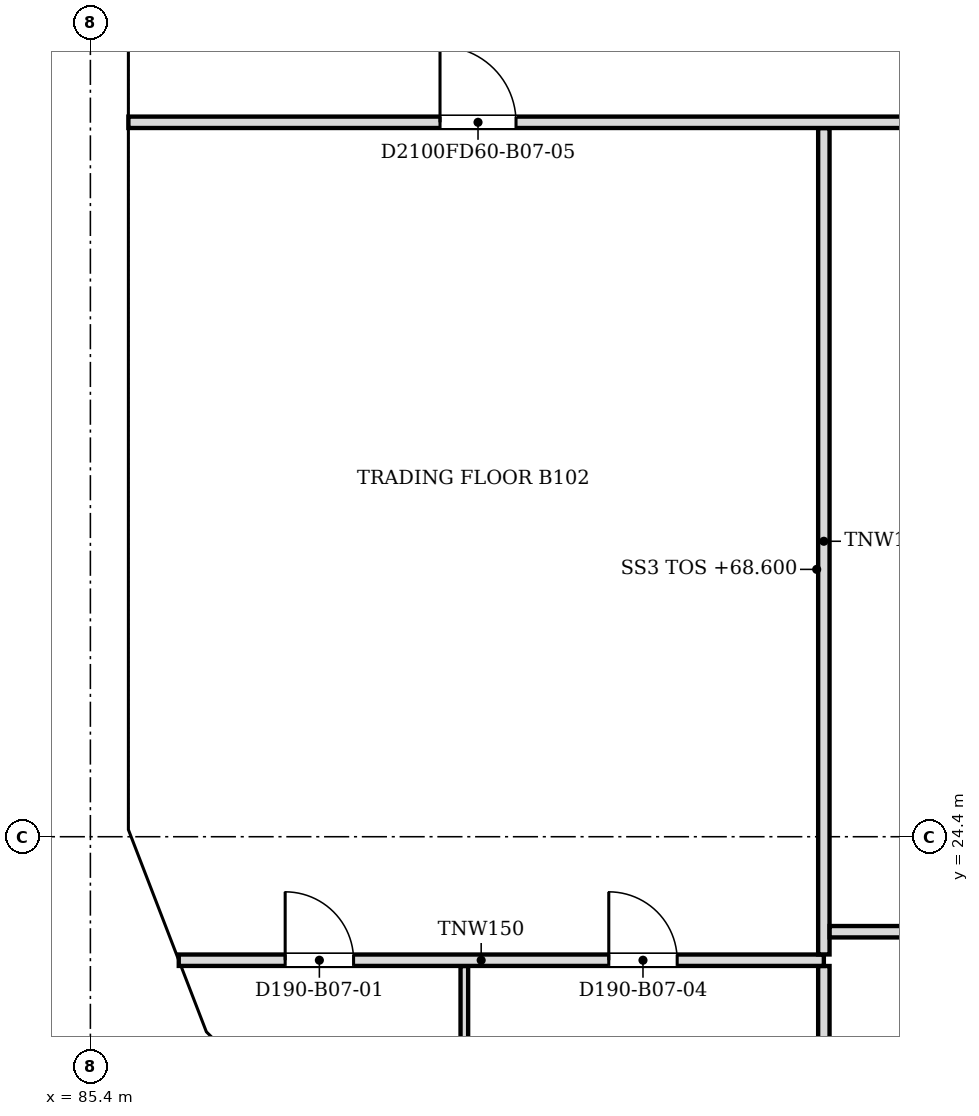
"""IFC4 building model, lengths in metres.
Left out: names, types, materials, properties, quantities, classifications, styles, units other than length and angle.
Written with IfcOpenShell. Run it as: python <this file> out.ifc"""

import sys

from ifc_helpers import new_model, si_unit, direction, frame, frame_2d, origin, place, context, subcontext, project, spatial, polyline, rectangle, outline, extrude, faceted_brep, source, transform, mapped, element, fill, save


model = new_model("IFC4")
c1 = context("Model", 3, precision=1e-05, world=origin(), true_north=direction((0.0, 1.0)))
c2 = subcontext(c1, "Body", "Model", "MODEL_VIEW")
j1 = project(units=[si_unit("LENGTHUNIT", "METRE"), si_unit("PLANEANGLEUNIT", "RADIAN")], contexts=[c1])
p1 = place(None, origin())
s1 = spatial("IfcSite", under=j1, at=p1, CompositionType="ELEMENT")
p2 = place(p1, origin())
s2 = spatial("IfcBuilding", under=s1, at=p2, CompositionType="ELEMENT")
p3 = place(p2, frame((0.0, 0.0, 68.6)))
s3 = spatial("IfcBuildingStorey", under=s2, at=p3, CompositionType="ELEMENT", Elevation=68.6)
m1 = source(origin(), c2, "Body", "SweptSolid", [
    extrude(outline(polyline([(6.1, 0.0), (3.05, 3.8), (0.0, 0.0), (6.1, 0.0)])), frame((0.0, 0.25, 0.0), z_axis=(0.0, -1.0, 0.0), x_axis=(1.0, 0.0, 0.0)), (0.0, 0.0, 1.0), 0.5),
])
p4 = place(p3, frame((85.65, 36.6, 0.0), z_axis=(0.0, 0.0, 1.0), x_axis=(0.0, -1.0, 0.0)))
e1 = element("IfcWall", 1, at=p4, inside=s3, PredefinedType="SOLIDWALL", context=c2, shape_type="MappedRepresentation", body=[
    mapped(m1, transform((0.0, 0.0, 0.0), scale=1.0)),
])
m2 = source(origin(), c2, "Body", "SweptSolid", [
    extrude(outline(polyline([(5.579, 0.25), (3.05, 3.4), (0.521, 0.25), (5.579, 0.25)])), frame((0.0, 0.26, 0.0), z_axis=(0.0, -1.0, 0.0), x_axis=(1.0, 0.0, 0.0)), (0.0, 0.0, 1.0), 0.52),
])
p5 = place(p4, origin())
e2 = element("IfcOpeningElement", 2, at=p5, cuts=e1, PredefinedType="OPENING", context=c2, shape_type="MappedRepresentation", body=[
    mapped(m2, transform((0.0, 0.0, 0.0), scale=1.0)),
])
m3 = source(origin(), c2, "Body", "Brep", [
    faceted_brep([(6.053, -0.25, 0.0), (3.05, -0.25, 3.8), (0.0, -0.25, 0.0), (0.0, 0.25, 0.0), (3.05, 0.25, 3.8), (6.007, 0.25, 0.059), (6.007, 0.25, 0.0), (6.053, 0.0, 0.0)], [[[0, 1, 2]], [[3, 4, 5, 6]], [[5, 4, 1, 0, 7]], [[4, 3, 2, 1]], [[3, 6, 7, 0, 2]], [[7, 6, 5]]]),
])
p6 = place(p3, frame((85.65, 30.5, 0.0), z_axis=(0.0, 0.0, 1.0), x_axis=(0.0, -1.0, 0.0)))
e3 = element("IfcWall", 3, at=p6, inside=s3, PredefinedType="SOLIDWALL", context=c2, shape_type="MappedRepresentation", body=[
    mapped(m3, transform((0.0, 0.0, 0.0), scale=1.0)),
])
m4 = source(origin(), c2, "Body", "SweptSolid", [
    extrude(outline(polyline([(5.537, 0.25), (3.049, 3.399), (0.521, 0.25), (5.537, 0.25)])), frame((0.0, 0.26, 0.0), z_axis=(0.0, -1.0, 0.0), x_axis=(1.0, 0.0, 0.0)), (0.0, 0.0, 1.0), 0.52),
])
p7 = place(p6, origin())
e4 = element("IfcOpeningElement", 4, at=p7, cuts=e3, PredefinedType="OPENING", context=c2, shape_type="MappedRepresentation", body=[
    mapped(m4, transform((0.0, 0.0, 0.0), scale=1.0)),
])
m5 = source(origin(), c2, "Body", "Brep", [
    faceted_brep([(3.003, -0.25, 3.731), (2.95, -0.25, 3.8), (0.0, -0.25, 0.0), (3.003, -0.25, 0.0), (0.047, 0.25, 0.06), (2.898, 0.25, 3.732), (2.898, 0.25, 0.0), (0.047, 0.25, 0.0), (2.95, 0.0, 3.8), (0.0, 0.0, 0.0)], [[[0, 1, 2, 3]], [[4, 5, 6, 7]], [[8, 1, 0]], [[5, 4, 9, 2, 1, 8]], [[7, 6, 3, 2, 9]], [[7, 9, 4]], [[3, 6, 5, 8, 0]]]),
])
p8 = place(p3, frame((85.65, 24.447, 0.0), z_axis=(0.0, 0.0, 1.0), x_axis=(0.35992665181, -0.932980602862, 0.0)))
e5 = element("IfcWall", 5, at=p8, inside=s3, PredefinedType="SOLIDWALL", context=c2, shape_type="MappedRepresentation", body=[
    mapped(m5, transform((0.0, 0.0, 0.0), scale=1.0)),
])
m6 = source(origin(), c2, "Body", "SweptSolid", [
    extrude(outline(polyline([(2.75, 3.135), (0.511, 0.25), (2.75, 0.25), (2.75, 3.135)])), frame((0.0, 0.26, 0.0), z_axis=(0.0, -1.0, 0.0), x_axis=(1.0, 0.0, 0.0)), (0.0, 0.0, 1.0), 0.52),
])
p9 = place(p8, origin())
e6 = element("IfcOpeningElement", 6, at=p9, cuts=e5, PredefinedType="OPENING", context=c2, shape_type="MappedRepresentation", body=[
    mapped(m6, transform((0.0, 0.0, 0.0), scale=1.0)),
])
m7 = source(origin(), c2, "Body", "Brep", [
    faceted_brep([(2.997, -0.25, 0.0), (0.053, -0.25, 3.8), (0.0, -0.25, 3.732), (0.0, -0.25, 0.0), (0.106, 0.25, 3.731), (2.944, 0.25, 0.068), (2.944, 0.25, 0.0), (0.106, 0.25, 0.0), (0.053, 0.0, 3.8), (2.997, 0.0, 0.0)], [[[0, 1, 2, 3]], [[4, 5, 6, 7]], [[5, 4, 8, 1, 0, 9]], [[2, 1, 8]], [[7, 6, 9, 0, 3]], [[7, 3, 2, 8, 4]], [[9, 6, 5]]]),
])
p10 = place(p3, frame((86.675, 21.731, 0.0), z_axis=(0.0, 0.0, 1.0), x_axis=(0.707106781187, -0.707106781187, 0.0)))
e7 = element("IfcWall", 7, at=p10, inside=s3, PredefinedType="SOLIDWALL", context=c2, shape_type="MappedRepresentation", body=[
    mapped(m7, transform((0.0, 0.0, 0.0), scale=1.0)),
])
m8 = source(origin(), c2, "Body", "SweptSolid", [
    extrude(outline(polyline([(2.487, 0.25), (0.253, 3.134), (0.253, 0.25), (2.487, 0.25)])), frame((0.0, 0.26, 0.0), z_axis=(0.0, -1.0, 0.0), x_axis=(1.0, 0.0, 0.0)), (0.0, 0.0, 1.0), 0.52),
])
p11 = place(p10, origin())
e8 = element("IfcOpeningElement", 8, at=p11, cuts=e7, PredefinedType="OPENING", context=c2, shape_type="MappedRepresentation", body=[
    mapped(m8, transform((0.0, 0.0, 0.0), scale=1.0)),
])
p12 = place(p2, frame((0.0, 0.0, 72.4)))
s4 = spatial("IfcBuildingStorey", under=s2, at=p12, CompositionType="ELEMENT", Elevation=72.4)
m9 = source(origin(), c2, "Body", "Brep", [
    faceted_brep([(3.05, -0.25, 0.0), (6.1, -0.25, 3.8), (6.1, -0.25, 3.8), (3.05, -0.25, 7.6), (0.0, -0.25, 3.8), (0.0, 0.25, 3.8), (3.05, 0.25, 7.6), (6.1, 0.25, 3.8), (6.1, 0.25, 3.8), (3.05, 0.25, 0.0)], [[[0, 1, 2, 3, 4]], [[5, 6, 7, 8, 9]], [[9, 8, 1, 0]], [[7, 6, 3, 2]], [[6, 5, 4, 3]], [[5, 9, 0, 4]], [[1, 8, 7, 2]]]),
])
p13 = place(p12, frame((85.65, 39.65, -3.8), z_axis=(0.0, 0.0, 1.0), x_axis=(0.0, -1.0, 0.0)))
e9 = element("IfcWall", 9, at=p13, inside=s4, PredefinedType="SOLIDWALL", context=c2, shape_type="MappedRepresentation", body=[
    mapped(m9, transform((0.0, 0.0, 0.0), scale=1.0)),
])
m10 = source(origin(), c2, "Body", "SweptSolid", [
    extrude(outline(polyline([(3.05, 0.399), (5.78, 3.8), (3.05, 7.2), (0.321, 3.8), (3.05, 0.399)])), frame((0.0, 0.26, 0.0), z_axis=(0.0, -1.0, 0.0), x_axis=(1.0, 0.0, 0.0)), (0.0, 0.0, 1.0), 0.52),
])
p14 = place(p13, origin())
e10 = element("IfcOpeningElement", 10, at=p14, cuts=e9, PredefinedType="OPENING", context=c2, shape_type="MappedRepresentation", body=[
    mapped(m10, transform((0.0, 0.0, 0.0), scale=1.0)),
])
m11 = source(origin(), c2, "Body", "SweptSolid", [
    extrude(outline(polyline([(3.05, 0.0), (6.1, 3.8), (3.05, 7.6), (0.0, 3.8), (3.05, 0.0)])), frame((0.0, 0.25, 0.0), z_axis=(0.0, -1.0, 0.0), x_axis=(1.0, 0.0, 0.0)), (0.0, 0.0, 1.0), 0.5),
])
p15 = place(p12, frame((85.65, 33.55, -3.8), z_axis=(0.0, 0.0, 1.0), x_axis=(0.0, -1.0, 0.0)))
e11 = element("IfcWall", 11, at=p15, inside=s4, PredefinedType="SOLIDWALL", context=c2, shape_type="MappedRepresentation", body=[
    mapped(m11, transform((0.0, 0.0, 0.0), scale=1.0)),
])
p16 = place(p15, origin())
e12 = element("IfcOpeningElement", 12, at=p16, cuts=e11, PredefinedType="OPENING", context=c2, shape_type="MappedRepresentation", body=[
    mapped(m10, transform((0.0, 0.0, 0.0), scale=1.0)),
])
m12 = source(origin(), c2, "Body", "Brep", [
    faceted_brep([(3.003, -0.25, 0.0), (3.05, -0.25, 0.06), (3.05, -0.25, 7.54), (3.003, -0.25, 7.6), (0.0, -0.25, 3.8), (0.0, 0.25, 3.8), (2.957, 0.25, 7.541), (2.957, 0.25, 0.059), (3.003, 0.0, 0.0), (3.003, 0.0, 7.6)], [[[0, 1, 2, 3, 4]], [[5, 6, 7]], [[1, 0, 8]], [[9, 3, 2]], [[6, 5, 4, 3, 9]], [[5, 7, 8, 0, 4]], [[1, 8, 7, 6, 9, 2]]]),
])
p17 = place(p12, frame((85.65, 27.45, -3.8), z_axis=(0.0, 0.0, 1.0), x_axis=(0.0, -1.0, 0.0)))
e13 = element("IfcWall", 13, at=p17, inside=s4, PredefinedType="SOLIDWALL", context=c2, shape_type="MappedRepresentation", body=[
    mapped(m12, transform((0.0, 0.0, 0.0), scale=1.0)),
])
m13 = source(origin(), c2, "Body", "SweptSolid", [
    extrude(outline(polyline([(2.803, 6.944), (0.319, 3.8), (2.803, 0.656), (2.803, 6.944)])), frame((0.0, 0.26, 0.0), z_axis=(0.0, -1.0, 0.0), x_axis=(1.0, 0.0, 0.0)), (0.0, 0.0, 1.0), 0.52),
])
p18 = place(p17, origin())
e14 = element("IfcOpeningElement", 14, at=p18, cuts=e13, PredefinedType="OPENING", context=c2, shape_type="MappedRepresentation", body=[
    mapped(m13, transform((0.0, 0.0, 0.0), scale=1.0)),
])
m14 = source(origin(), c2, "Body", "Brep", [
    faceted_brep([(0.047, -0.25, 0.0), (2.997, -0.25, 3.8), (0.047, -0.25, 7.6), (0.0, -0.25, 7.541), (0.0, -0.25, 0.059), (0.093, 0.25, 7.54), (2.944, 0.25, 3.868), (2.944, 0.25, 3.732), (0.093, 0.25, 0.06), (2.997, 0.0, 3.8), (0.047, 0.0, 0.0), (0.047, 0.0, 7.6)], [[[0, 1, 2, 3, 4]], [[5, 6, 7, 8]], [[8, 7, 9, 1, 0, 10]], [[6, 5, 11, 2, 1, 9]], [[3, 2, 11]], [[10, 0, 4]], [[8, 10, 4, 3, 11, 5]], [[9, 7, 6]]]),
])
p19 = place(p12, frame((85.633, 24.49, -3.8), z_axis=(0.0, 0.0, 1.0), x_axis=(0.359901446078, -0.932990326376, 0.0)))
e15 = element("IfcWall", 15, at=p19, inside=s4, PredefinedType="SOLIDWALL", context=c2, shape_type="MappedRepresentation", body=[
    mapped(m14, transform((0.0, 0.0, 0.0), scale=1.0)),
])
m15 = source(origin(), c2, "Body", "SweptSolid", [
    extrude(outline(polyline([(0.247, 0.665), (2.681, 3.8), (0.247, 6.935), (0.247, 0.665)])), frame((0.0, 0.26, 0.0), z_axis=(0.0, -1.0, 0.0), x_axis=(1.0, 0.0, 0.0)), (0.0, 0.0, 1.0), 0.52),
])
p20 = place(p19, origin())
e16 = element("IfcOpeningElement", 16, at=p20, cuts=e15, PredefinedType="OPENING", context=c2, shape_type="MappedRepresentation", body=[
    mapped(m15, transform((0.0, 0.0, 0.0), scale=1.0)),
])
m16 = source(origin(), c2, "Body", "Brep", [
    faceted_brep([(2.944, -0.25, 0.0), (2.997, -0.25, 0.068), (2.997, -0.25, 7.532), (2.944, -0.25, 7.6), (0.0, -0.25, 3.8), (0.053, 0.25, 3.868), (2.891, 0.25, 7.532), (2.891, 0.25, 0.068), (0.053, 0.25, 3.731), (2.944, 0.0, 0.0), (2.944, 0.0, 7.6), (0.0, 0.0, 3.8)], [[[0, 1, 2, 3, 4]], [[5, 6, 7, 8]], [[1, 0, 9]], [[10, 3, 2]], [[6, 5, 11, 4, 3, 10]], [[8, 7, 9, 0, 4, 11]], [[8, 11, 5]], [[1, 9, 7, 6, 10, 2]]]),
])
p21 = place(p12, frame((86.712, 21.694, -3.8), z_axis=(0.0, 0.0, 1.0), x_axis=(0.707066050402, -0.707147509625, 0.0)))
e17 = element("IfcWall", 17, at=p21, inside=s4, PredefinedType="SOLIDWALL", context=c2, shape_type="MappedRepresentation", body=[
    mapped(m16, transform((0.0, 0.0, 0.0), scale=1.0)),
])
m17 = source(origin(), c2, "Body", "SweptSolid", [
    extrude(outline(polyline([(2.744, 6.934), (0.316, 3.8), (2.744, 0.666), (2.744, 6.934)])), frame((0.0, 0.26, 0.0), z_axis=(0.0, -1.0, 0.0), x_axis=(1.0, 0.0, 0.0)), (0.0, 0.0, 1.0), 0.52),
])
p22 = place(p21, origin())
e18 = element("IfcOpeningElement", 18, at=p22, cuts=e17, PredefinedType="OPENING", context=c2, shape_type="MappedRepresentation", body=[
    mapped(m17, transform((0.0, 0.0, 0.0), scale=1.0)),
])
p23 = place(p3, frame((95.05, 18.8, 0.0), z_axis=(0.0, 0.0, 1.0), x_axis=(0.0, 1.0, 0.0)))
e19 = element("IfcWall", 19, at=p23, inside=s3, PredefinedType="PARTITIONING", context=c2, shape_type="SweptSolid", body=[
    extrude(rectangle(XDim=3.899, YDim=0.15, at=frame_2d((1.949, 0.0))), origin(), (0.0, 0.0, 1.0), 3.067),
])
p24 = place(p3, frame((90.32, 19.291, 0.0), z_axis=(0.0, 0.0, 1.0), x_axis=(0.0, 1.0, 0.0)))
e20 = element("IfcWall", 20, at=p24, inside=s3, PredefinedType="PARTITIONING", context=c2, shape_type="SweptSolid", body=[
    extrude(rectangle(XDim=3.408, YDim=0.1, at=frame_2d((1.704, 0.0))), origin(), (0.0, 0.0, 1.0), 3.067),
])
p25 = place(p3, frame((95.05, 22.775, 0.0), z_axis=(0.0, 0.0, 1.0), x_axis=(-1.0, 0.0, 0.0)))
e21 = element("IfcWall", 21, at=p25, inside=s3, PredefinedType="PARTITIONING", context=c2, shape_type="SweptSolid", body=[
    extrude(rectangle(XDim=8.487, YDim=0.15, at=frame_2d((4.244, 0.0))), origin(), (0.0, 0.0, 1.0), 3.067),
])
m18 = source(origin(), c2, "Body", "SweptSolid", [
    extrude(rectangle(XDim=0.9, YDim=2.1, at=frame_2d((0.45, 1.05))), frame((0.0, 0.085, 0.0), z_axis=(0.0, -1.0, 0.0), x_axis=(1.0, 0.0, 0.0)), (0.0, 0.0, 1.0), 0.17),
])
p26 = place(p25, frame((6.187, 0.0, 0.0)))
e22 = element("IfcOpeningElement", 22, at=p26, cuts=e21, PredefinedType="OPENING", context=c2, shape_type="MappedRepresentation", body=[
    mapped(m18, transform((0.0, 0.0, 0.0), scale=1.0)),
])
p27 = place(p25, frame((1.93, 0.0, 0.0)))
e23 = element("IfcOpeningElement", 23, at=p27, cuts=e21, PredefinedType="OPENING", context=c2, shape_type="MappedRepresentation", body=[
    mapped(m18, transform((0.0, 0.0, 0.0), scale=1.0)),
])
p28 = place(p3, frame((95.05, 22.851, 0.0), z_axis=(0.0, 0.0, 1.0), x_axis=(0.0, 1.0, 0.0)))
e24 = element("IfcWall", 24, at=p28, inside=s3, PredefinedType="PARTITIONING", context=c2, shape_type="SweptSolid", body=[
    extrude(rectangle(XDim=10.873, YDim=0.15, at=frame_2d((5.437, 0.0))), origin(), (0.0, 0.0, 1.0), 3.067),
])
p29 = place(p3, frame((107.25, 23.15, 0.0), z_axis=(0.0, 0.0, 1.0), x_axis=(-1.0, 0.0, 0.0)))
e25 = element("IfcWall", 25, at=p29, inside=s3, PredefinedType="PARTITIONING", context=c2, shape_type="SweptSolid", body=[
    extrude(rectangle(XDim=12.124, YDim=0.15, at=frame_2d((6.062, 0.0))), origin(), (0.0, 0.0, 1.0), 3.067),
])
p30 = place(p29, frame((8.324, 0.0, 0.0)))
e26 = element("IfcOpeningElement", 26, at=p30, cuts=e25, PredefinedType="OPENING", context=c2, shape_type="MappedRepresentation", body=[
    mapped(m18, transform((0.0, 0.0, 0.0), scale=1.0)),
])
p31 = place(p29, frame((2.706, 0.0, 0.0)))
e27 = element("IfcOpeningElement", 27, at=p31, cuts=e25, PredefinedType="OPENING", context=c2, shape_type="MappedRepresentation", body=[
    mapped(m18, transform((0.0, 0.0, 0.0), scale=1.0)),
])
p32 = place(p3, frame((133.7, 33.8, 0.0), z_axis=(0.0, 0.0, 1.0), x_axis=(-1.0, 0.0, 0.0)))
e28 = element("IfcWall", 28, at=p32, inside=s3, PredefinedType="PARTITIONING", context=c2, shape_type="SweptSolid", body=[
    extrude(rectangle(XDim=47.8, YDim=0.15, at=frame_2d((23.9, 0.0))), origin(), (0.0, 0.0, 1.0), 3.067),
])
m19 = source(origin(), c2, "Body", "SweptSolid", [
    extrude(rectangle(XDim=1.0, YDim=2.1, at=frame_2d((0.5, 1.05))), frame((0.0, 0.085, 0.0), z_axis=(0.0, -1.0, 0.0), x_axis=(1.0, 0.0, 0.0)), (0.0, 0.0, 1.0), 0.17),
])
p33 = place(p32, frame((3.549, 0.0, 0.0)))
e29 = element("IfcOpeningElement", 29, at=p33, cuts=e28, PredefinedType="OPENING", context=c2, shape_type="MappedRepresentation", body=[
    mapped(m19, transform((0.0, 0.0, 0.0), scale=1.0)),
])
p34 = place(p32, frame((42.7, 0.0, 0.0)))
e30 = element("IfcOpeningElement", 30, at=p34, cuts=e28, PredefinedType="OPENING", context=c2, shape_type="MappedRepresentation", body=[
    mapped(m19, transform((0.0, 0.0, 0.0), scale=1.0)),
])
p35 = place(p32, frame((12.199, 0.0, 0.0)))
e31 = element("IfcOpeningElement", 31, at=p35, cuts=e28, PredefinedType="OPENING", context=c2, shape_type="MappedRepresentation", body=[
    mapped(m19, transform((0.0, 0.0, 0.0), scale=1.0)),
])
p36 = place(p32, frame((21.349, 0.0, 0.0)))
e32 = element("IfcOpeningElement", 32, at=p36, cuts=e28, PredefinedType="OPENING", context=c2, shape_type="MappedRepresentation", body=[
    mapped(m19, transform((0.0, 0.0, 0.0), scale=1.0)),
])
p37 = place(p32, frame((32.05, 0.0, 0.0)))
e33 = element("IfcOpeningElement", 33, at=p37, cuts=e28, PredefinedType="OPENING", context=c2, shape_type="MappedRepresentation", body=[
    mapped(m19, transform((0.0, 0.0, 0.0), scale=1.0)),
])
m20 = source(origin(), c2, "Body", "SweptSolid", [
    extrude(rectangle(XDim=0.9, YDim=2.1, at=frame_2d((0.45, 1.05))), frame((0.0, 0.025, 0.0), z_axis=(0.0, -1.0, 0.0), x_axis=(1.0, 0.0, 0.0)), (0.0, 0.0, 1.0), 0.05),
])
p38 = place(p26, origin())
e34 = element("IfcDoor", 34, at=p38, inside=s3, OperationType="SINGLE_SWING_RIGHT", PredefinedType="DOOR", context=c2, shape_type="MappedRepresentation", body=[
    mapped(m20, transform((0.0, 0.0, 0.0), scale=1.0)),
])
fill(e22, e34)
p39 = place(p27, origin())
e35 = element("IfcDoor", 35, at=p39, inside=s3, OperationType="SINGLE_SWING_RIGHT", PredefinedType="DOOR", context=c2, shape_type="MappedRepresentation", body=[
    mapped(m20, transform((0.0, 0.0, 0.0), scale=1.0)),
])
fill(e23, e35)
m21 = source(origin(), c2, "Body", "SweptSolid", [
    extrude(rectangle(XDim=1.0, YDim=2.1, at=frame_2d((0.5, 1.05))), frame((0.0, 0.025, 0.0), z_axis=(0.0, -1.0, 0.0), x_axis=(1.0, 0.0, 0.0)), (0.0, 0.0, 1.0), 0.05),
])
p40 = place(p34, origin())
e36 = element("IfcDoor", 36, at=p40, inside=s3, OperationType="SINGLE_SWING_RIGHT", PredefinedType="DOOR", context=c2, shape_type="MappedRepresentation", body=[
    mapped(m21, transform((0.0, 0.0, 0.0), scale=1.0)),
])
fill(e30, e36)
save(model, sys.argv[1])
